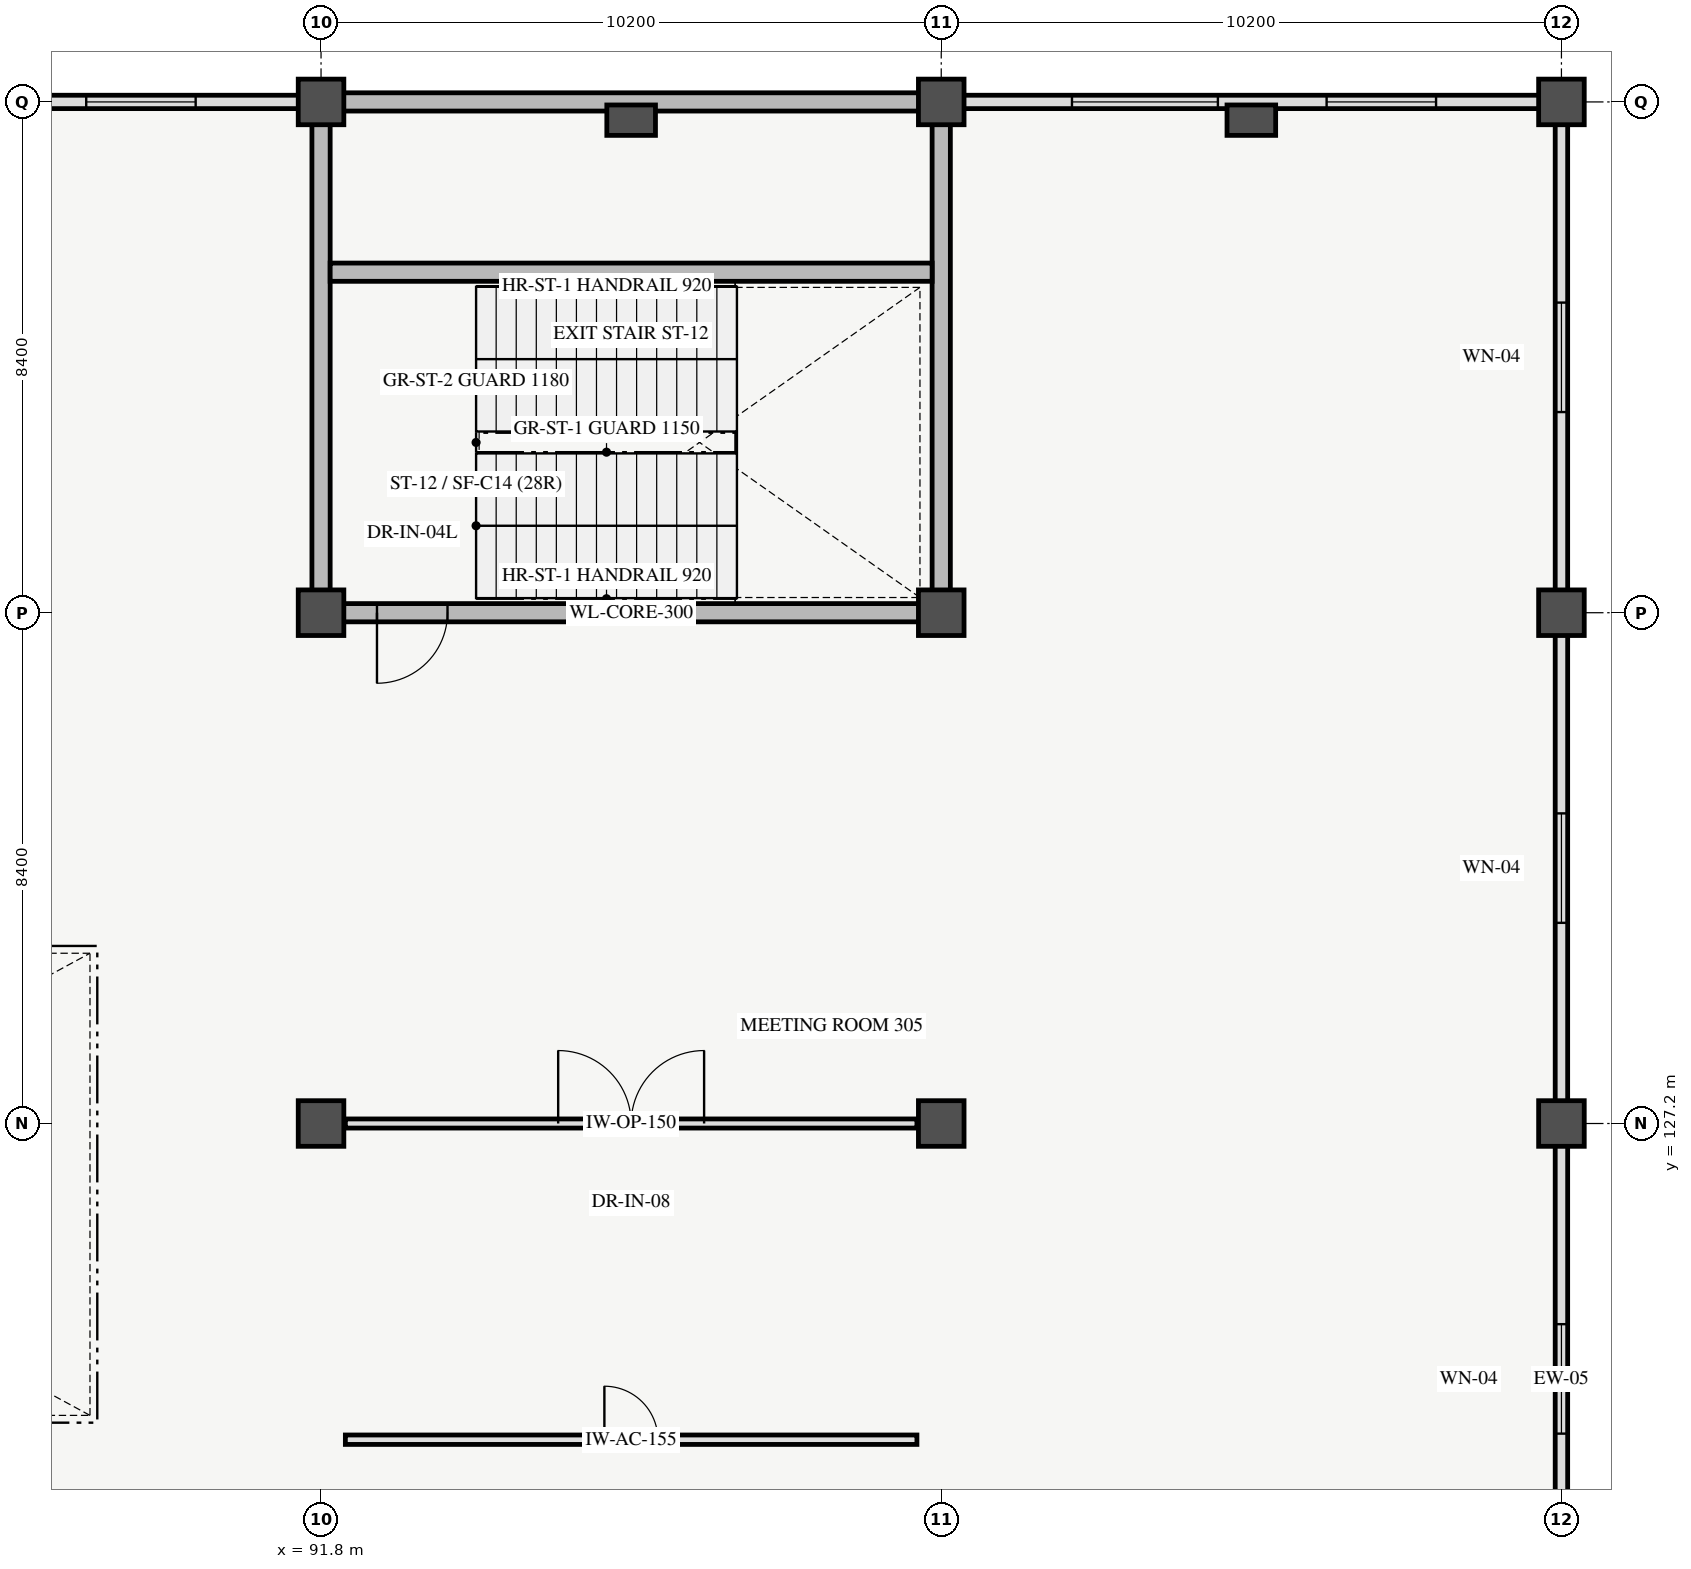
"""IFC4 building model, lengths in metres.
Left out: names, types, materials, properties, quantities, classifications, styles, units other than length and angle.
Written with IfcOpenShell. Run it as: python <this file> out.ifc"""

import sys

from ifc_helpers import new_model, si_unit, direction, frame, frame_2d, origin, origin_2d, place, context, subcontext, project, spatial, rectangle, extrude, element, fill, save


model = new_model("IFC4")
c1 = context("Model", 3, precision=1e-05, world=origin(), true_north=direction((0.0, 1.0)))
c2 = subcontext(c1, "Body", "Model", "MODEL_VIEW")
j1 = project(units=[si_unit("LENGTHUNIT", "METRE"), si_unit("PLANEANGLEUNIT", "RADIAN")], contexts=[c1])
p1 = place(None, origin())
s1 = spatial("IfcSite", under=j1, at=p1, CompositionType="ELEMENT")
p2 = place(p1, origin())
s2 = spatial("IfcBuilding", under=s1, at=p2, CompositionType="ELEMENT")
p3 = place(p2, frame((0.0, 0.0, 10.8)))
s3 = spatial("IfcBuildingStorey", under=s2, at=p3, CompositionType="ELEMENT", Elevation=10.8)
for number, where, z_axis, x_axis in (
    (1, (91.8, 127.2, 0.0), (0.0, 0.0, 1.0), (1.0, 0.0, 0.0)),
    (2, (91.8, 135.6, 0.0), (0.0, 0.0, 1.0), (1.0, 0.0, 0.0)),
    (3, (91.8, 144.0, 0.0), (0.0, 0.0, 1.0), (1.0, 0.0, 0.0)),
    (4, (102.0, 127.2, 0.0), (0.0, 0.0, 1.0), (1.0, 0.0, 0.0)),
    (5, (102.0, 135.6, 0.0), (0.0, 0.0, 1.0), (1.0, 0.0, 0.0)),
    (6, (102.0, 144.0, 0.0), (0.0, 0.0, 1.0), (1.0, 0.0, 0.0)),
    (7, (112.2, 127.2, 0.0), (0.0, 0.0, 1.0), (1.0, 0.0, 0.0)),
    (8, (112.2, 135.6, 0.0), (0.0, 0.0, 1.0), (1.0, 0.0, 0.0)),
    (9, (112.2, 144.0, 0.0), (0.0, 0.0, 1.0), (1.0, 0.0, 0.0)),
):
    element("IfcColumn", number, at=place(p3, frame(where, z_axis=z_axis, x_axis=x_axis)), inside=s3, PredefinedType="COLUMN", context=c2, shape_type="SweptSolid", body=[
        extrude(rectangle(XDim=0.75, YDim=0.75, at=origin_2d()), origin(), (0.0, 0.0, 1.0), 4.2),
    ])
for number, where, z_axis, x_axis in (
    (10, (96.9, 143.7, 0.0), (0.0, 0.0, 1.0), (1.0, 0.0, 0.0)),
    (11, (107.1, 143.7, 0.0), (0.0, 0.0, 1.0), (1.0, 0.0, 0.0)),
):
    element("IfcColumn", number, at=place(p3, frame(where, z_axis=z_axis, x_axis=x_axis)), inside=s3, PredefinedType="PILASTER", context=c2, shape_type="SweptSolid", body=[
        extrude(rectangle(XDim=0.8, YDim=0.5, at=origin_2d()), origin(), (0.0, 0.0, 1.0), 4.2),
    ])
p4 = place(p3, frame((81.84, 144.0, 0.0), z_axis=(0.0, 0.0, 1.0), x_axis=(1.0, 0.0, 0.0)))
e12 = element("IfcWall", 12, at=p4, inside=s3, PredefinedType="STANDARD", context=c2, shape_type="SweptSolid", body=[
    extrude(rectangle(XDim=9.72, YDim=0.22, at=frame_2d((4.86, 0.0))), origin(), (0.0, 0.0, 1.0), 3.06),
])
p5 = place(p4, frame((1.91, 0.0, 0.7)))
e13 = element("IfcOpeningElement", 13, at=p5, cuts=e12, PredefinedType="OPENING", context=c2, shape_type="SweptSolid", body=[
    extrude(rectangle(XDim=2.4, YDim=2.1, at=frame_2d((1.2, 1.05))), frame((0.0, 0.12, 0.0), z_axis=(0.0, -1.0, 0.0), x_axis=(1.0, 0.0, 0.0)), (0.0, 0.0, 1.0), 0.24),
])
p6 = place(p4, frame((6.098, 0.0, 0.85)))
e14 = element("IfcOpeningElement", 14, at=p6, cuts=e12, PredefinedType="OPENING", context=c2, shape_type="SweptSolid", body=[
    extrude(rectangle(XDim=1.8, YDim=1.8, at=frame_2d((0.9, 0.9))), frame((0.0, 0.12, 0.0), z_axis=(0.0, -1.0, 0.0), x_axis=(1.0, 0.0, 0.0)), (0.0, 0.0, 1.0), 0.24),
])
p7 = place(p3, frame((102.24, 144.0, 0.0), z_axis=(0.0, 0.0, 1.0), x_axis=(1.0, 0.0, 0.0)))
e15 = element("IfcWall", 15, at=p7, inside=s3, PredefinedType="STANDARD", context=c2, shape_type="SweptSolid", body=[
    extrude(rectangle(XDim=9.72, YDim=0.22, at=frame_2d((4.86, 0.0))), origin(), (0.0, 0.0, 1.0), 3.06),
])
p8 = place(p7, frame((1.91, 0.0, 0.7)))
e16 = element("IfcOpeningElement", 16, at=p8, cuts=e15, PredefinedType="OPENING", context=c2, shape_type="SweptSolid", body=[
    extrude(rectangle(XDim=2.4, YDim=2.1, at=frame_2d((1.2, 1.05))), frame((0.0, 0.12, 0.0), z_axis=(0.0, -1.0, 0.0), x_axis=(1.0, 0.0, 0.0)), (0.0, 0.0, 1.0), 0.24),
])
p9 = place(p7, frame((6.098, 0.0, 0.85)))
e17 = element("IfcOpeningElement", 17, at=p9, cuts=e15, PredefinedType="OPENING", context=c2, shape_type="SweptSolid", body=[
    extrude(rectangle(XDim=1.8, YDim=1.8, at=frame_2d((0.9, 0.9))), frame((0.0, 0.12, 0.0), z_axis=(0.0, -1.0, 0.0), x_axis=(1.0, 0.0, 0.0)), (0.0, 0.0, 1.0), 0.24),
])
p10 = place(p3, frame((112.2, 119.04, 0.0), z_axis=(0.0, 0.0, 1.0), x_axis=(0.0, 1.0, 0.0)))
e18 = element("IfcWall", 18, at=p10, inside=s3, PredefinedType="STANDARD", context=c2, shape_type="SweptSolid", body=[
    extrude(rectangle(XDim=7.92, YDim=0.205, at=frame_2d((3.96, 0.0))), origin(), (0.0, 0.0, 1.0), 3.06),
])
p11 = place(p10, frame((3.06, 0.0, 0.95)))
e19 = element("IfcOpeningElement", 19, at=p11, cuts=e18, PredefinedType="OPENING", context=c2, shape_type="SweptSolid", body=[
    extrude(rectangle(XDim=1.8, YDim=1.8, at=frame_2d((0.9, 0.9))), frame((0.0, 0.113, 0.0), z_axis=(0.0, -1.0, 0.0), x_axis=(1.0, 0.0, 0.0)), (0.0, 0.0, 1.0), 0.225),
])
p12 = place(p3, frame((112.2, 127.44, 0.0), z_axis=(0.0, 0.0, 1.0), x_axis=(0.0, 1.0, 0.0)))
e20 = element("IfcWall", 20, at=p12, inside=s3, PredefinedType="STANDARD", context=c2, shape_type="SweptSolid", body=[
    extrude(rectangle(XDim=7.92, YDim=0.205, at=frame_2d((3.96, 0.0))), origin(), (0.0, 0.0, 1.0), 3.06),
])
p13 = place(p12, frame((3.06, 0.0, 0.95)))
e21 = element("IfcOpeningElement", 21, at=p13, cuts=e20, PredefinedType="OPENING", context=c2, shape_type="SweptSolid", body=[
    extrude(rectangle(XDim=1.8, YDim=1.8, at=frame_2d((0.9, 0.9))), frame((0.0, 0.113, 0.0), z_axis=(0.0, -1.0, 0.0), x_axis=(1.0, 0.0, 0.0)), (0.0, 0.0, 1.0), 0.225),
])
p14 = place(p3, frame((112.2, 135.84, 0.0), z_axis=(0.0, 0.0, 1.0), x_axis=(0.0, 1.0, 0.0)))
e22 = element("IfcWall", 22, at=p14, inside=s3, PredefinedType="STANDARD", context=c2, shape_type="SweptSolid", body=[
    extrude(rectangle(XDim=7.92, YDim=0.205, at=frame_2d((3.96, 0.0))), origin(), (0.0, 0.0, 1.0), 3.06),
])
p15 = place(p14, frame((3.06, 0.0, 0.95)))
e23 = element("IfcOpeningElement", 23, at=p15, cuts=e22, PredefinedType="OPENING", context=c2, shape_type="SweptSolid", body=[
    extrude(rectangle(XDim=1.8, YDim=1.8, at=frame_2d((0.9, 0.9))), frame((0.0, 0.113, 0.0), z_axis=(0.0, -1.0, 0.0), x_axis=(1.0, 0.0, 0.0)), (0.0, 0.0, 1.0), 0.225),
])
p16 = place(p3, frame((91.8, 135.6, 0.0), z_axis=(0.0, 0.0, 1.0), x_axis=(1.0, 0.0, 0.0)))
e24 = element("IfcWall", 24, at=p16, inside=s3, PredefinedType="SHEAR", context=c2, shape_type="SweptSolid", body=[
    extrude(rectangle(XDim=10.2, YDim=0.3, at=frame_2d((5.1, 0.0))), origin(), (0.0, 0.0, 1.0), 4.2),
])
p17 = place(p16, frame((0.92, 0.0, 0.0)))
e25 = element("IfcOpeningElement", 25, at=p17, cuts=e24, PredefinedType="OPENING", context=c2, shape_type="SweptSolid", body=[
    extrude(rectangle(XDim=1.16, YDim=2.2, at=frame_2d((0.58, 1.1))), frame((0.0, 0.16, 0.0), z_axis=(0.0, -1.0, 0.0), x_axis=(1.0, 0.0, 0.0)), (0.0, 0.0, 1.0), 0.32),
])
p18 = place(p3, frame((91.8, 144.0, 0.0), z_axis=(0.0, 0.0, 1.0), x_axis=(1.0, 0.0, 0.0)))
e26 = element("IfcWall", 26, at=p18, inside=s3, PredefinedType="SHEAR", context=c2, shape_type="SweptSolid", body=[
    extrude(rectangle(XDim=10.2, YDim=0.3, at=frame_2d((5.1, 0.0))), origin(), (0.0, 0.0, 1.0), 4.2),
])
for number, where, z_axis, x_axis in (
    (27, (91.8, 135.6, 0.0), (0.0, 0.0, 1.0), (0.0, 1.0, 0.0)),
    (28, (102.0, 135.6, 0.0), (0.0, 0.0, 1.0), (0.0, 1.0, 0.0)),
):
    element("IfcWall", number, at=place(p3, frame(where, z_axis=z_axis, x_axis=x_axis)), inside=s3, PredefinedType="SHEAR", context=c2, shape_type="SweptSolid", body=[
        extrude(rectangle(XDim=8.4, YDim=0.3, at=frame_2d((4.2, 0.0))), origin(), (0.0, 0.0, 1.0), 4.2),
    ])
p19 = place(p3, frame((91.95, 141.2, 0.0), z_axis=(0.0, 0.0, 1.0), x_axis=(1.0, 0.0, 0.0)))
e29 = element("IfcWall", 29, at=p19, inside=s3, PredefinedType="SHEAR", context=c2, shape_type="SweptSolid", body=[
    extrude(rectangle(XDim=9.9, YDim=0.3, at=frame_2d((4.95, 0.0))), origin(), (0.0, 0.0, 1.0), 4.2),
])
p20 = place(p3, frame((92.2, 127.2, 0.0), z_axis=(0.0, 0.0, 1.0), x_axis=(1.0, 0.0, 0.0)))
e30 = element("IfcWall", 30, at=p20, inside=s3, PredefinedType="MOVABLE", context=c2, shape_type="SweptSolid", body=[
    extrude(rectangle(XDim=9.4, YDim=0.15, at=frame_2d((4.7, 0.0))), origin(), (0.0, 0.0, 1.0), 3.06),
])
p21 = place(p20, frame((3.5, 0.0, 0.0)))
e31 = element("IfcOpeningElement", 31, at=p21, cuts=e30, PredefinedType="OPENING", context=c2, shape_type="SweptSolid", body=[
    extrude(rectangle(XDim=2.4, YDim=2.4, at=frame_2d((1.2, 1.2))), frame((0.0, 0.085, 0.0), z_axis=(0.0, -1.0, 0.0), x_axis=(1.0, 0.0, 0.0)), (0.0, 0.0, 1.0), 0.17),
])
p22 = place(p3, frame((92.2, 122.0, 0.0), z_axis=(0.0, 0.0, 1.0), x_axis=(1.0, 0.0, 0.0)))
e32 = element("IfcWall", 32, at=p22, inside=s3, PredefinedType="PARTITIONING", context=c2, shape_type="SweptSolid", body=[
    extrude(rectangle(XDim=9.4, YDim=0.155, at=frame_2d((4.7, 0.0))), origin(), (0.0, 0.0, 1.0), 3.06),
])
p23 = place(p22, frame((4.26, 0.0, 0.0)))
e33 = element("IfcOpeningElement", 33, at=p23, cuts=e32, PredefinedType="OPENING", context=c2, shape_type="SweptSolid", body=[
    extrude(rectangle(XDim=0.88, YDim=2.08, at=frame_2d((0.44, 1.04))), frame((0.0, 0.087, 0.0), z_axis=(0.0, -1.0, 0.0), x_axis=(1.0, 0.0, 0.0)), (0.0, 0.0, 1.0), 0.175),
])
p24 = place(p6, origin())
e34 = element("IfcWindow", 34, at=p24, inside=s3, PartitioningType="DOUBLE_PANEL_VERTICAL", PredefinedType="WINDOW", context=c2, shape_type="SweptSolid", body=[
    extrude(rectangle(XDim=1.8, YDim=1.8, at=frame_2d((0.9, 0.9))), frame((0.0, 0.03, 0.0), z_axis=(0.0, -1.0, 0.0), x_axis=(1.0, 0.0, 0.0)), (0.0, 0.0, 1.0), 0.06),
])
fill(e14, e34)
p25 = place(p8, origin())
e35 = element("IfcWindow", 35, at=p25, inside=s3, PartitioningType="DOUBLE_PANEL_VERTICAL", PredefinedType="WINDOW", context=c2, shape_type="SweptSolid", body=[
    extrude(rectangle(XDim=2.4, YDim=2.1, at=frame_2d((1.2, 1.05))), frame((0.0, 0.03, 0.0), z_axis=(0.0, -1.0, 0.0), x_axis=(1.0, 0.0, 0.0)), (0.0, 0.0, 1.0), 0.06),
])
fill(e16, e35)
p26 = place(p9, origin())
e36 = element("IfcWindow", 36, at=p26, inside=s3, PartitioningType="DOUBLE_PANEL_VERTICAL", PredefinedType="WINDOW", context=c2, shape_type="SweptSolid", body=[
    extrude(rectangle(XDim=1.8, YDim=1.8, at=frame_2d((0.9, 0.9))), frame((0.0, 0.03, 0.0), z_axis=(0.0, -1.0, 0.0), x_axis=(1.0, 0.0, 0.0)), (0.0, 0.0, 1.0), 0.06),
])
fill(e17, e36)
p27 = place(p11, origin())
e37 = element("IfcWindow", 37, at=p27, inside=s3, PartitioningType="DOUBLE_PANEL_VERTICAL", PredefinedType="WINDOW", context=c2, shape_type="SweptSolid", body=[
    extrude(rectangle(XDim=1.8, YDim=1.8, at=frame_2d((0.9, 0.9))), frame((0.0, 0.03, 0.0), z_axis=(0.0, -1.0, 0.0), x_axis=(1.0, 0.0, 0.0)), (0.0, 0.0, 1.0), 0.06),
])
fill(e19, e37)
p28 = place(p13, origin())
e38 = element("IfcWindow", 38, at=p28, inside=s3, PartitioningType="DOUBLE_PANEL_VERTICAL", PredefinedType="WINDOW", context=c2, shape_type="SweptSolid", body=[
    extrude(rectangle(XDim=1.8, YDim=1.8, at=frame_2d((0.9, 0.9))), frame((0.0, 0.03, 0.0), z_axis=(0.0, -1.0, 0.0), x_axis=(1.0, 0.0, 0.0)), (0.0, 0.0, 1.0), 0.06),
])
fill(e21, e38)
p29 = place(p15, origin())
e39 = element("IfcWindow", 39, at=p29, inside=s3, PartitioningType="DOUBLE_PANEL_VERTICAL", PredefinedType="WINDOW", context=c2, shape_type="SweptSolid", body=[
    extrude(rectangle(XDim=1.8, YDim=1.8, at=frame_2d((0.9, 0.9))), frame((0.0, 0.03, 0.0), z_axis=(0.0, -1.0, 0.0), x_axis=(1.0, 0.0, 0.0)), (0.0, 0.0, 1.0), 0.06),
])
fill(e23, e39)
p30 = place(p17, origin())
e40 = element("IfcDoor", 40, at=p30, inside=s3, OperationType="SINGLE_SWING_LEFT", PredefinedType="DOOR", context=c2, shape_type="SweptSolid", body=[
    extrude(rectangle(XDim=1.16, YDim=2.2, at=frame_2d((0.58, 1.1))), frame((0.0, 0.025, 0.0), z_axis=(0.0, -1.0, 0.0), x_axis=(1.0, 0.0, 0.0)), (0.0, 0.0, 1.0), 0.05),
])
fill(e25, e40)
p31 = place(p21, origin())
e41 = element("IfcDoor", 41, at=p31, inside=s3, OperationType="DOUBLE_DOOR_SINGLE_SWING", PredefinedType="DOOR", context=c2, shape_type="SweptSolid", body=[
    extrude(rectangle(XDim=2.4, YDim=2.4, at=frame_2d((1.2, 1.2))), frame((0.0, 0.025, 0.0), z_axis=(0.0, -1.0, 0.0), x_axis=(1.0, 0.0, 0.0)), (0.0, 0.0, 1.0), 0.05),
])
fill(e31, e41)
p32 = place(p23, origin())
e42 = element("IfcDoor", 42, at=p32, inside=s3, OperationType="SINGLE_SWING_LEFT", PredefinedType="DOOR", context=c2, shape_type="SweptSolid", body=[
    extrude(rectangle(XDim=0.88, YDim=2.08, at=frame_2d((0.44, 1.04))), frame((0.0, 0.025, 0.0), z_axis=(0.0, -1.0, 0.0), x_axis=(1.0, 0.0, 0.0)), (0.0, 0.0, 1.0), 0.05),
])
fill(e33, e42)
save(model, sys.argv[1])
